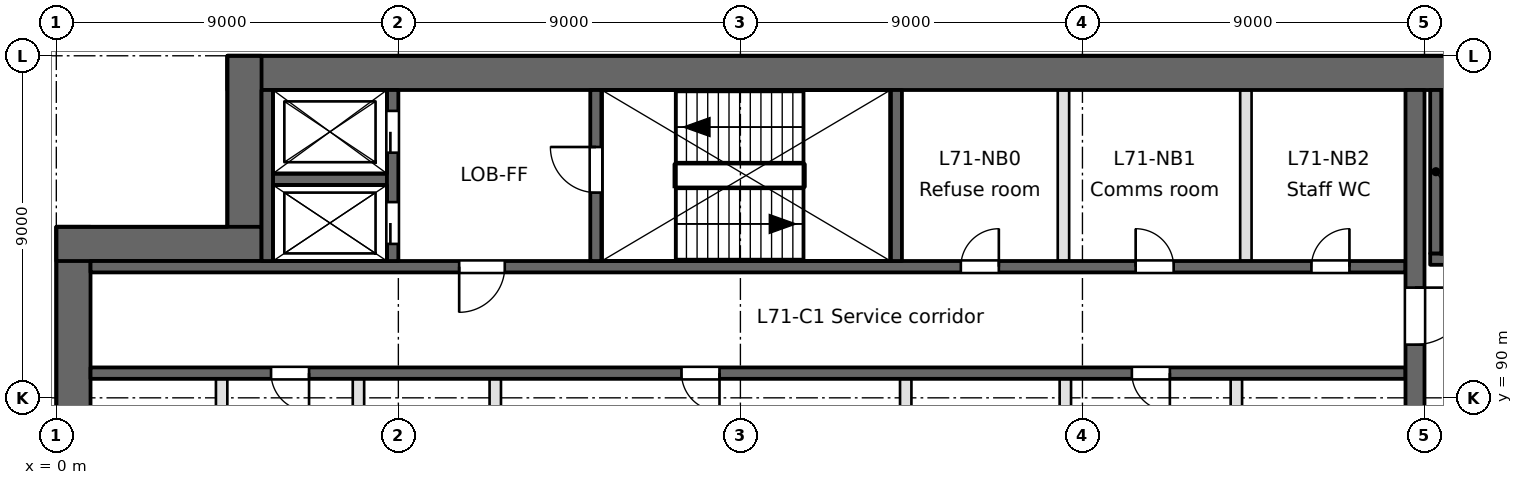
"""IFC4 building model, lengths in metres.
Left out: names, types, materials, properties, quantities, classifications, styles, units other than length and angle.
Written with IfcOpenShell. Run it as: python <this file> out.ifc"""

import sys

from ifc_helpers import new_model, si_unit, direction, frame, frame_2d, origin, place, context, subcontext, project, spatial, rectangle, extrude, element, fill, save


model = new_model("IFC4")
c1 = context("Model", 3, precision=1e-05, world=origin(), true_north=direction((0.0, 1.0)))
c2 = subcontext(c1, "Body", "Model", "MODEL_VIEW")
j1 = project(units=[si_unit("LENGTHUNIT", "METRE"), si_unit("PLANEANGLEUNIT", "RADIAN")], contexts=[c1])
p1 = place(None, origin())
s1 = spatial("IfcSite", under=j1, at=p1, CompositionType="ELEMENT")
p2 = place(p1, origin())
s2 = spatial("IfcBuilding", under=s1, at=p2, CompositionType="ELEMENT")
p3 = place(p2, frame((0.0, 0.0, 276.2)))
s3 = spatial("IfcBuildingStorey", under=s2, at=p3, CompositionType="ELEMENT", Elevation=276.2)
p4 = place(p3, frame((0.45, 94.5, 0.0), z_axis=(0.0, 0.0, 1.0), x_axis=(0.0, -1.0, 0.0)))
e1 = element("IfcWall", 1, at=p4, inside=s3, PredefinedType="SHEAR", context=c2, shape_type="SweptSolid", body=[
    extrude(rectangle(XDim=40.456, YDim=0.9, at=frame_2d((20.228, 0.0))), origin(), (0.0, 0.0, 1.0), 4.6),
])
p5 = place(p3, frame((49.5, 98.55, 0.0), z_axis=(0.0, 0.0, 1.0), x_axis=(-1.0, 0.0, 0.0)))
e2 = element("IfcWall", 2, at=p5, inside=s3, PredefinedType="SHEAR", context=c2, shape_type="SweptSolid", body=[
    extrude(rectangle(XDim=45.0, YDim=0.9, at=frame_2d((22.5, 0.0))), origin(), (0.0, 0.0, 1.0), 4.6),
])
for number, where, z_axis, x_axis in (
    (3, (4.95, 99.0, 0.0), (0.0, 0.0, 1.0), (0.0, -1.0, 0.0)),
    (4, (5.4, 94.05, 0.0), (0.0, 0.0, 1.0), (-1.0, 0.0, 0.0)),
):
    element("IfcWall", number, at=place(p3, frame(where, z_axis=z_axis, x_axis=x_axis)), inside=s3, PredefinedType="SHEAR", context=c2, shape_type="SweptSolid", body=[
        extrude(rectangle(XDim=5.4, YDim=0.9, at=frame_2d((2.7, 0.0))), origin(), (0.0, 0.0, 1.0), 4.6),
    ])
p6 = place(p3, frame((0.9, 90.65, -0.45), z_axis=(0.0, 0.0, 1.0), x_axis=(1.0, 0.0, 0.0)))
e5 = element("IfcWall", 5, at=p6, inside=s3, PredefinedType="SOLIDWALL", context=c2, shape_type="SweptSolid", body=[
    extrude(rectangle(XDim=34.6, YDim=0.3, at=frame_2d((17.3, 0.0))), origin(), (0.0, 0.0, 1.0), 4.65),
])
p7 = place(p6, frame((15.55, 0.0, 0.45)))
e6 = element("IfcOpeningElement", 6, at=p7, cuts=e5, PredefinedType="OPENING", context=c2, shape_type="SweptSolid", body=[
    extrude(rectangle(XDim=1.0, YDim=2.1, at=frame_2d((0.5, 1.05))), frame((0.0, 0.15, 0.0), z_axis=(0.0, -1.0, 0.0), x_axis=(1.0, 0.0, 0.0)), (0.0, 0.0, 1.0), 0.3),
])
p8 = place(p6, frame((4.75, 0.0, 0.45)))
e7 = element("IfcOpeningElement", 7, at=p8, cuts=e5, PredefinedType="OPENING", context=c2, shape_type="SweptSolid", body=[
    extrude(rectangle(XDim=1.0, YDim=2.1, at=frame_2d((0.5, 1.05))), frame((0.0, 0.15, 0.0), z_axis=(0.0, -1.0, 0.0), x_axis=(1.0, 0.0, 0.0)), (0.0, 0.0, 1.0), 0.3),
])
p9 = place(p6, frame((27.4, 0.0, 0.45)))
e8 = element("IfcOpeningElement", 8, at=p9, cuts=e5, PredefinedType="OPENING", context=c2, shape_type="SweptSolid", body=[
    extrude(rectangle(XDim=1.0, YDim=2.1, at=frame_2d((0.5, 1.05))), frame((0.0, 0.15, 0.0), z_axis=(0.0, -1.0, 0.0), x_axis=(1.0, 0.0, 0.0)), (0.0, 0.0, 1.0), 0.3),
])
p10 = place(p3, frame((0.9, 93.45, -0.45), z_axis=(0.0, 0.0, 1.0), x_axis=(1.0, 0.0, 0.0)))
e9 = element("IfcWall", 9, at=p10, inside=s3, PredefinedType="SOLIDWALL", context=c2, shape_type="SweptSolid", body=[
    extrude(rectangle(XDim=34.6, YDim=0.3, at=frame_2d((17.3, 0.0))), origin(), (0.0, 0.0, 1.0), 4.65),
])
p11 = place(p10, frame((9.7, 0.0, 0.45)))
e10 = element("IfcOpeningElement", 10, at=p11, cuts=e9, PredefinedType="OPENING", context=c2, shape_type="SweptSolid", body=[
    extrude(rectangle(XDim=1.2, YDim=2.1, at=frame_2d((0.6, 1.05))), frame((0.0, 0.15, 0.0), z_axis=(0.0, -1.0, 0.0), x_axis=(1.0, 0.0, 0.0)), (0.0, 0.0, 1.0), 0.3),
])
p12 = place(p10, frame((22.9, 0.0, 0.45)))
e11 = element("IfcOpeningElement", 11, at=p12, cuts=e9, PredefinedType="OPENING", context=c2, shape_type="SweptSolid", body=[
    extrude(rectangle(XDim=1.0, YDim=2.1, at=frame_2d((0.5, 1.05))), frame((0.0, 0.15, 0.0), z_axis=(0.0, -1.0, 0.0), x_axis=(1.0, 0.0, 0.0)), (0.0, 0.0, 1.0), 0.3),
])
p13 = place(p10, frame((27.5, 0.0, 0.45)))
e12 = element("IfcOpeningElement", 12, at=p13, cuts=e9, PredefinedType="OPENING", context=c2, shape_type="SweptSolid", body=[
    extrude(rectangle(XDim=1.0, YDim=2.1, at=frame_2d((0.5, 1.05))), frame((0.0, 0.15, 0.0), z_axis=(0.0, -1.0, 0.0), x_axis=(1.0, 0.0, 0.0)), (0.0, 0.0, 1.0), 0.3),
])
p14 = place(p10, frame((32.125, 0.0, 0.45)))
e13 = element("IfcOpeningElement", 13, at=p14, cuts=e9, PredefinedType="OPENING", context=c2, shape_type="SweptSolid", body=[
    extrude(rectangle(XDim=1.0, YDim=2.1, at=frame_2d((0.5, 1.05))), frame((0.0, 0.15, 0.0), z_axis=(0.0, -1.0, 0.0), x_axis=(1.0, 0.0, 0.0)), (0.0, 0.0, 1.0), 0.3),
])
p15 = place(p3, frame((36.15, 93.65, -0.45), z_axis=(0.0, 0.0, 1.0), x_axis=(1.0, 0.0, 0.0)))
e14 = element("IfcWall", 14, at=p15, inside=s3, PredefinedType="SOLIDWALL", context=c2, shape_type="SweptSolid", body=[
    extrude(rectangle(XDim=8.2, YDim=0.3, at=frame_2d((4.1, 0.0))), origin(), (0.0, 0.0, 1.0), 4.65),
])
p16 = place(p15, frame((0.7, 0.0, 0.45)))
e15 = element("IfcOpeningElement", 15, at=p16, cuts=e14, PredefinedType="OPENING", context=c2, shape_type="SweptSolid", body=[
    extrude(rectangle(XDim=1.2, YDim=2.1, at=frame_2d((0.6, 1.05))), frame((0.0, 0.15, 0.0), z_axis=(0.0, -1.0, 0.0), x_axis=(1.0, 0.0, 0.0)), (0.0, 0.0, 1.0), 0.3),
])
p17 = place(p3, frame((5.7, 95.75, -0.45), z_axis=(0.0, 0.0, 1.0), x_axis=(1.0, 0.0, 0.0)))
e16 = element("IfcWall", 16, at=p17, inside=s3, PredefinedType="SOLIDWALL", context=c2, shape_type="SweptSolid", body=[
    extrude(rectangle(XDim=3.0, YDim=0.3, at=frame_2d((1.5, 0.0))), origin(), (0.0, 0.0, 1.0), 4.65),
])
p18 = place(p3, frame((4.35, 77.55, 0.0), z_axis=(0.0, 0.0, 1.0), x_axis=(0.0, 1.0, 0.0)))
e17 = element("IfcWall", 17, at=p18, inside=s3, PredefinedType="PARTITIONING", context=c2, shape_type="SweptSolid", body=[
    extrude(rectangle(XDim=12.95, YDim=0.3, at=frame_2d((6.475, 0.0))), origin(), (0.0, 0.0, 1.0), 4.2),
])
p19 = place(p3, frame((5.55, 93.6, -0.45), z_axis=(0.0, 0.0, 1.0), x_axis=(0.0, 1.0, 0.0)))
e18 = element("IfcWall", 18, at=p19, inside=s3, PredefinedType="SOLIDWALL", context=c2, shape_type="SweptSolid", body=[
    extrude(rectangle(XDim=4.5, YDim=0.3, at=frame_2d((2.25, 0.0))), origin(), (0.0, 0.0, 1.0), 4.65),
])
p20 = place(p3, frame((7.95, 77.55, 0.0), z_axis=(0.0, 0.0, 1.0), x_axis=(0.0, 1.0, 0.0)))
e19 = element("IfcWall", 19, at=p20, inside=s3, PredefinedType="PARTITIONING", context=c2, shape_type="SweptSolid", body=[
    extrude(rectangle(XDim=12.95, YDim=0.3, at=frame_2d((6.475, 0.0))), origin(), (0.0, 0.0, 1.0), 4.2),
])
p21 = place(p3, frame((8.85, 93.6, -0.45), z_axis=(0.0, 0.0, 1.0), x_axis=(0.0, 1.0, 0.0)))
e20 = element("IfcWall", 20, at=p21, inside=s3, PredefinedType="SOLIDWALL", context=c2, shape_type="SweptSolid", body=[
    extrude(rectangle(XDim=4.5, YDim=0.3, at=frame_2d((2.25, 0.0))), origin(), (0.0, 0.0, 1.0), 4.65),
])
p22 = place(p21, frame((0.45, 0.0, 0.45)))
e21 = element("IfcOpeningElement", 21, at=p22, cuts=e20, PredefinedType="OPENING", context=c2, shape_type="SweptSolid", body=[
    extrude(rectangle(XDim=1.1, YDim=2.1, at=frame_2d((0.55, 1.05))), frame((0.0, 0.15, 0.0), z_axis=(0.0, -1.0, 0.0), x_axis=(1.0, 0.0, 0.0)), (0.0, 0.0, 1.0), 0.3),
])
p23 = place(p21, frame((2.85, 0.0, 0.45)))
e22 = element("IfcOpeningElement", 22, at=p23, cuts=e20, PredefinedType="OPENING", context=c2, shape_type="SweptSolid", body=[
    extrude(rectangle(XDim=1.1, YDim=2.1, at=frame_2d((0.55, 1.05))), frame((0.0, 0.15, 0.0), z_axis=(0.0, -1.0, 0.0), x_axis=(1.0, 0.0, 0.0)), (0.0, 0.0, 1.0), 0.3),
])
p24 = place(p3, frame((11.55, 87.95, 0.0), z_axis=(0.0, 0.0, 1.0), x_axis=(0.0, 1.0, 0.0)))
e23 = element("IfcWall", 23, at=p24, inside=s3, PredefinedType="PARTITIONING", context=c2, shape_type="SweptSolid", body=[
    extrude(rectangle(XDim=2.55, YDim=0.3, at=frame_2d((1.275, 0.0))), origin(), (0.0, 0.0, 1.0), 4.2),
])
p25 = place(p3, frame((14.2, 93.6, -0.45), z_axis=(0.0, 0.0, 1.0), x_axis=(0.0, 1.0, 0.0)))
e24 = element("IfcWall", 24, at=p25, inside=s3, PredefinedType="SOLIDWALL", context=c2, shape_type="SweptSolid", body=[
    extrude(rectangle(XDim=4.5, YDim=0.3, at=frame_2d((2.25, 0.0))), origin(), (0.0, 0.0, 1.0), 4.65),
])
p26 = place(p25, frame((1.8, 0.0, 0.45)))
e25 = element("IfcOpeningElement", 25, at=p26, cuts=e24, PredefinedType="OPENING", context=c2, shape_type="SweptSolid", body=[
    extrude(rectangle(XDim=1.2, YDim=2.1, at=frame_2d((0.6, 1.05))), frame((0.0, 0.15, 0.0), z_axis=(0.0, -1.0, 0.0), x_axis=(1.0, 0.0, 0.0)), (0.0, 0.0, 1.0), 0.3),
])
p27 = place(p3, frame((22.1, 93.6, -0.45), z_axis=(0.0, 0.0, 1.0), x_axis=(0.0, 1.0, 0.0)))
e26 = element("IfcWall", 26, at=p27, inside=s3, PredefinedType="SOLIDWALL", context=c2, shape_type="SweptSolid", body=[
    extrude(rectangle(XDim=4.5, YDim=0.3, at=frame_2d((2.25, 0.0))), origin(), (0.0, 0.0, 1.0), 4.65),
])
p28 = place(p3, frame((22.35, 87.95, 0.0), z_axis=(0.0, 0.0, 1.0), x_axis=(0.0, 1.0, 0.0)))
e27 = element("IfcWall", 27, at=p28, inside=s3, PredefinedType="PARTITIONING", context=c2, shape_type="SweptSolid", body=[
    extrude(rectangle(XDim=2.55, YDim=0.3, at=frame_2d((1.275, 0.0))), origin(), (0.0, 0.0, 1.0), 4.2),
])
p29 = place(p3, frame((26.5, 93.6, 0.0), z_axis=(0.0, 0.0, 1.0), x_axis=(0.0, 1.0, 0.0)))
e28 = element("IfcWall", 28, at=p29, inside=s3, PredefinedType="PARTITIONING", context=c2, shape_type="SweptSolid", body=[
    extrude(rectangle(XDim=4.5, YDim=0.3, at=frame_2d((2.25, 0.0))), origin(), (0.0, 0.0, 1.0), 4.2),
])
for number, where, z_axis, x_axis in (
    (29, (26.55, 77.55, 0.0), (0.0, 0.0, 1.0), (0.0, 1.0, 0.0)),
    (30, (31.05, 77.55, 0.0), (0.0, 0.0, 1.0), (0.0, 1.0, 0.0)),
):
    element("IfcWall", number, at=place(p3, frame(where, z_axis=z_axis, x_axis=x_axis)), inside=s3, PredefinedType="PARTITIONING", context=c2, shape_type="SweptSolid", body=[
        extrude(rectangle(XDim=12.95, YDim=0.3, at=frame_2d((6.475, 0.0))), origin(), (0.0, 0.0, 1.0), 4.2),
    ])
p30 = place(p3, frame((31.3, 93.6, 0.0), z_axis=(0.0, 0.0, 1.0), x_axis=(0.0, 1.0, 0.0)))
e31 = element("IfcWall", 31, at=p30, inside=s3, PredefinedType="PARTITIONING", context=c2, shape_type="SweptSolid", body=[
    extrude(rectangle(XDim=4.5, YDim=0.3, at=frame_2d((2.25, 0.0))), origin(), (0.0, 0.0, 1.0), 4.2),
])
p31 = place(p3, frame((35.75, 63.5, -0.45), z_axis=(0.0, 0.0, 1.0), x_axis=(0.0, 1.0, 0.0)))
e32 = element("IfcWall", 32, at=p31, inside=s3, PredefinedType="SOLIDWALL", context=c2, shape_type="SweptSolid", body=[
    extrude(rectangle(XDim=34.6, YDim=0.5, at=frame_2d((17.3, 0.0))), origin(), (0.0, 0.0, 1.0), 4.65),
])
p32 = place(p31, frame((9.7, 0.0, 0.45)))
e33 = element("IfcOpeningElement", 33, at=p32, cuts=e32, PredefinedType="OPENING", context=c2, shape_type="SweptSolid", body=[
    extrude(rectangle(XDim=2.4, YDim=2.1, at=frame_2d((1.2, 1.05))), frame((0.0, 0.25, 0.0), z_axis=(0.0, -1.0, 0.0), x_axis=(1.0, 0.0, 0.0)), (0.0, 0.0, 1.0), 0.5),
])
p33 = place(p31, frame((27.9, 0.0, 0.45)))
e34 = element("IfcOpeningElement", 34, at=p33, cuts=e32, PredefinedType="OPENING", context=c2, shape_type="SweptSolid", body=[
    extrude(rectangle(XDim=1.5, YDim=2.1, at=frame_2d((0.75, 1.05))), frame((0.0, 0.25, 0.0), z_axis=(0.0, -1.0, 0.0), x_axis=(1.0, 0.0, 0.0)), (0.0, 0.0, 1.0), 0.5),
])
p34 = place(p31, frame((1.5, 0.0, 0.45)))
e35 = element("IfcOpeningElement", 35, at=p34, cuts=e32, PredefinedType="OPENING", context=c2, shape_type="SweptSolid", body=[
    extrude(rectangle(XDim=1.2, YDim=2.1, at=frame_2d((0.6, 1.05))), frame((0.0, 0.25, 0.0), z_axis=(0.0, -1.0, 0.0), x_axis=(1.0, 0.0, 0.0)), (0.0, 0.0, 1.0), 0.5),
])
p35 = place(p3, frame((36.3, 93.8, -0.45), z_axis=(0.0, 0.0, 1.0), x_axis=(0.0, 1.0, 0.0)))
e36 = element("IfcWall", 36, at=p35, inside=s3, PredefinedType="SOLIDWALL", context=c2, shape_type="SweptSolid", body=[
    extrude(rectangle(XDim=4.3, YDim=0.3, at=frame_2d((2.15, 0.0))), origin(), (0.0, 0.0, 1.0), 4.65),
])
p36 = place(p22, origin())
e37 = element("IfcDoor", 37, at=p36, inside=s3, OperationType="SLIDING_TO_RIGHT", PredefinedType="DOOR", context=c2, shape_type="SweptSolid", body=[
    extrude(rectangle(XDim=1.1, YDim=2.1, at=frame_2d((0.55, 1.05))), frame((0.0, 0.025, 0.0), z_axis=(0.0, -1.0, 0.0), x_axis=(1.0, 0.0, 0.0)), (0.0, 0.0, 1.0), 0.05),
])
fill(e21, e37)
p37 = place(p23, origin())
e38 = element("IfcDoor", 38, at=p37, inside=s3, OperationType="SLIDING_TO_LEFT", PredefinedType="DOOR", context=c2, shape_type="SweptSolid", body=[
    extrude(rectangle(XDim=1.1, YDim=2.1, at=frame_2d((0.55, 1.05))), frame((0.0, 0.025, 0.0), z_axis=(0.0, -1.0, 0.0), x_axis=(1.0, 0.0, 0.0)), (0.0, 0.0, 1.0), 0.05),
])
fill(e22, e38)
p38 = place(p11, frame((1.2, 0.0, 0.0), z_axis=(0.0, 0.0, 1.0), x_axis=(-1.0, 0.0, 0.0)))
e39 = element("IfcDoor", 39, at=p38, inside=s3, OperationType="SINGLE_SWING_RIGHT", PredefinedType="DOOR", context=c2, shape_type="SweptSolid", body=[
    extrude(rectangle(XDim=1.2, YDim=2.1, at=frame_2d((0.6, 1.05))), frame((0.0, 0.025, 0.0), z_axis=(0.0, -1.0, 0.0), x_axis=(1.0, 0.0, 0.0)), (0.0, 0.0, 1.0), 0.05),
])
fill(e10, e39)
p39 = place(p33, frame((1.5, 0.0, 0.0), z_axis=(0.0, 0.0, 1.0), x_axis=(-1.0, 0.0, 0.0)))
e40 = element("IfcDoor", 40, at=p39, inside=s3, OperationType="SINGLE_SWING_LEFT", PredefinedType="DOOR", context=c2, shape_type="SweptSolid", body=[
    extrude(rectangle(XDim=1.5, YDim=2.1, at=frame_2d((0.75, 1.05))), frame((0.0, 0.025, 0.0), z_axis=(0.0, -1.0, 0.0), x_axis=(1.0, 0.0, 0.0)), (0.0, 0.0, 1.0), 0.05),
])
fill(e34, e40)
p40 = place(p26, origin())
e41 = element("IfcDoor", 41, at=p40, inside=s3, OperationType="SINGLE_SWING_RIGHT", PredefinedType="DOOR", context=c2, shape_type="SweptSolid", body=[
    extrude(rectangle(XDim=1.2, YDim=2.1, at=frame_2d((0.6, 1.05))), frame((0.0, 0.025, 0.0), z_axis=(0.0, -1.0, 0.0), x_axis=(1.0, 0.0, 0.0)), (0.0, 0.0, 1.0), 0.05),
])
fill(e25, e41)
p41 = place(p7, frame((1.0, 0.0, 0.0), z_axis=(0.0, 0.0, 1.0), x_axis=(-1.0, 0.0, 0.0)))
e42 = element("IfcDoor", 42, at=p41, inside=s3, OperationType="SINGLE_SWING_LEFT", PredefinedType="DOOR", context=c2, shape_type="SweptSolid", body=[
    extrude(rectangle(XDim=1.0, YDim=2.1, at=frame_2d((0.5, 1.05))), frame((0.0, 0.025, 0.0), z_axis=(0.0, -1.0, 0.0), x_axis=(1.0, 0.0, 0.0)), (0.0, 0.0, 1.0), 0.05),
])
fill(e6, e42)
p42 = place(p8, frame((1.0, 0.0, 0.0), z_axis=(0.0, 0.0, 1.0), x_axis=(-1.0, 0.0, 0.0)))
e43 = element("IfcDoor", 43, at=p42, inside=s3, OperationType="SINGLE_SWING_LEFT", PredefinedType="DOOR", context=c2, shape_type="SweptSolid", body=[
    extrude(rectangle(XDim=1.0, YDim=2.1, at=frame_2d((0.5, 1.05))), frame((0.0, 0.025, 0.0), z_axis=(0.0, -1.0, 0.0), x_axis=(1.0, 0.0, 0.0)), (0.0, 0.0, 1.0), 0.05),
])
fill(e7, e43)
p43 = place(p9, frame((1.0, 0.0, 0.0), z_axis=(0.0, 0.0, 1.0), x_axis=(-1.0, 0.0, 0.0)))
e44 = element("IfcDoor", 44, at=p43, inside=s3, OperationType="SINGLE_SWING_LEFT", PredefinedType="DOOR", context=c2, shape_type="SweptSolid", body=[
    extrude(rectangle(XDim=1.0, YDim=2.1, at=frame_2d((0.5, 1.05))), frame((0.0, 0.025, 0.0), z_axis=(0.0, -1.0, 0.0), x_axis=(1.0, 0.0, 0.0)), (0.0, 0.0, 1.0), 0.05),
])
fill(e8, e44)
p44 = place(p12, origin())
e45 = element("IfcDoor", 45, at=p44, inside=s3, OperationType="SINGLE_SWING_RIGHT", PredefinedType="DOOR", context=c2, shape_type="SweptSolid", body=[
    extrude(rectangle(XDim=1.0, YDim=2.1, at=frame_2d((0.5, 1.05))), frame((0.0, 0.025, 0.0), z_axis=(0.0, -1.0, 0.0), x_axis=(1.0, 0.0, 0.0)), (0.0, 0.0, 1.0), 0.05),
])
fill(e11, e45)
p45 = place(p13, origin())
e46 = element("IfcDoor", 46, at=p45, inside=s3, OperationType="SINGLE_SWING_LEFT", PredefinedType="DOOR", context=c2, shape_type="SweptSolid", body=[
    extrude(rectangle(XDim=1.0, YDim=2.1, at=frame_2d((0.5, 1.05))), frame((0.0, 0.025, 0.0), z_axis=(0.0, -1.0, 0.0), x_axis=(1.0, 0.0, 0.0)), (0.0, 0.0, 1.0), 0.05),
])
fill(e12, e46)
p46 = place(p14, origin())
e47 = element("IfcDoor", 47, at=p46, inside=s3, OperationType="SINGLE_SWING_RIGHT", PredefinedType="DOOR", context=c2, shape_type="SweptSolid", body=[
    extrude(rectangle(XDim=1.0, YDim=2.1, at=frame_2d((0.5, 1.05))), frame((0.0, 0.025, 0.0), z_axis=(0.0, -1.0, 0.0), x_axis=(1.0, 0.0, 0.0)), (0.0, 0.0, 1.0), 0.05),
])
fill(e13, e47)
save(model, sys.argv[1])
